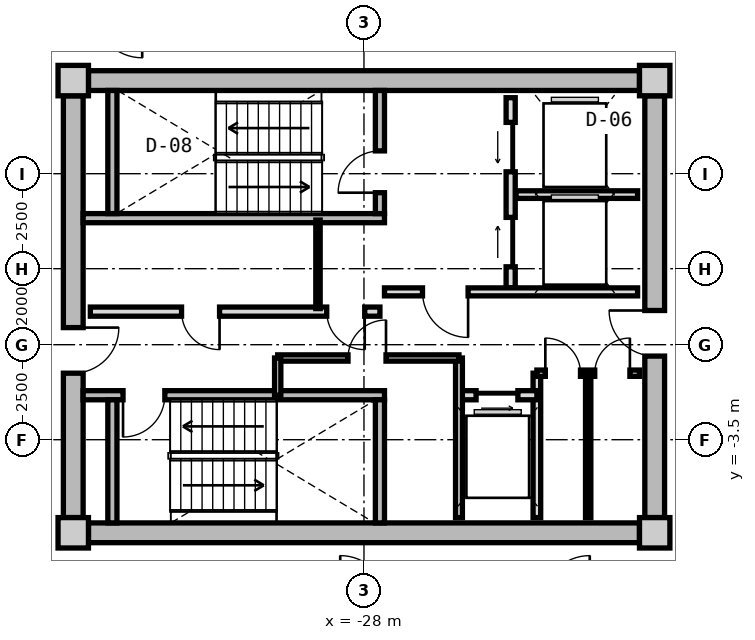
"""IFC4 building model, lengths in metres.
Left out: names, types, materials, properties, quantities, classifications, styles, units other than length and angle.
Written with IfcOpenShell. Run it as: python <this file> out.ifc"""

import sys

from ifc_helpers import new_model, si_unit, direction, frame, frame_2d, origin, origin_2d, place, context, subcontext, project, spatial, rectangle, extrude, source, transform, mapped, element, fill, save


model = new_model("IFC4")
c1 = context("Model", 3, precision=1e-05, world=origin(), true_north=direction((0.0, 1.0)))
c2 = subcontext(c1, "Body", "Model", "MODEL_VIEW")
j1 = project(units=[si_unit("LENGTHUNIT", "METRE"), si_unit("PLANEANGLEUNIT", "RADIAN")], contexts=[c1])
p1 = place(None, origin())
s1 = spatial("IfcSite", under=j1, at=p1, CompositionType="ELEMENT")
p2 = place(p1, origin())
s2 = spatial("IfcBuilding", under=s1, at=p2, CompositionType="ELEMENT")
p3 = place(p2, frame((0.0, 0.0, 203.8)))
s3 = spatial("IfcBuildingStorey", under=s2, at=p3, CompositionType="ELEMENT", Elevation=203.8)
m1 = source(origin(), c2, "Body", "SweptSolid", [
    extrude(rectangle(XDim=0.8, YDim=0.8, at=origin_2d()), origin(), (0.0, 0.0, 1.0), 4.0),
])
for number, where, z_axis, x_axis in (
    (1, (-35.65, -5.95, 0.0), (0.0, 0.0, 1.0), (1.0, 0.0, 0.0)),
    (2, (-20.35, -5.95, 0.0), (0.0, 0.0, 1.0), (1.0, 0.0, 0.0)),
    (3, (-20.35, 5.95, 0.0), (0.0, 0.0, 1.0), (1.0, 0.0, 0.0)),
    (4, (-35.65, 5.95, 0.0), (0.0, 0.0, 1.0), (1.0, 0.0, 0.0)),
):
    element("IfcColumn", number, at=place(p3, frame(where, z_axis=z_axis, x_axis=x_axis)), inside=s3, PredefinedType="COLUMN", context=c2, shape_type="MappedRepresentation", body=[
        mapped(m1, transform((0.0, 0.0, 0.0), x_axis=(1.0, 0.0, 0.0), y_axis=(0.0, 1.0, 0.0), z_axis=(0.0, 0.0, 1.0), scale=1.0)),
    ])
m2 = source(origin(), c2, "Body", "SweptSolid", [
    extrude(rectangle(XDim=14.5, YDim=0.52, at=frame_2d((7.25, 0.0))), origin(), (0.0, 0.0, 1.0), 3.71),
])
for number, where, z_axis, x_axis in (
    (5, (-35.25, 5.95, 0.0), (0.0, 0.0, 1.0), (1.0, 0.0, 0.0)),
    (6, (-20.75, -5.95, 0.0), (0.0, 0.0, 1.0), (-1.0, 0.0, 0.0)),
):
    element("IfcWall", number, at=place(p3, frame(where, z_axis=z_axis, x_axis=x_axis)), inside=s3, PredefinedType="SHEAR", context=c2, shape_type="MappedRepresentation", body=[
        mapped(m2, transform((0.0, 0.0, 0.0), x_axis=(1.0, 0.0, 0.0), y_axis=(0.0, 1.0, 0.0), z_axis=(0.0, 0.0, 1.0), scale=1.0)),
    ])
m3 = source(origin(), c2, "Body", "SweptSolid", [
    extrude(rectangle(XDim=11.1, YDim=0.52, at=frame_2d((5.55, 0.0))), origin(), (0.0, 0.0, 1.0), 3.71),
])
p4 = place(p3, frame((-35.65, -5.55, 0.0), z_axis=(0.0, 0.0, 1.0), x_axis=(0.0, 1.0, 0.0)))
e7 = element("IfcWall", 7, at=p4, inside=s3, PredefinedType="SHEAR", context=c2, shape_type="MappedRepresentation", body=[
    mapped(m3, transform((0.0, 0.0, 0.0), x_axis=(1.0, 0.0, 0.0), y_axis=(0.0, 1.0, 0.0), z_axis=(0.0, 0.0, 1.0), scale=1.0)),
])
p5 = place(p4, frame((3.8, 0.0, 0.0)))
e8 = element("IfcOpeningElement", 8, at=p5, cuts=e7, PredefinedType="OPENING", context=c2, shape_type="SweptSolid", body=[
    extrude(rectangle(XDim=1.2, YDim=2.15, at=frame_2d((0.6, 1.075))), frame((0.0, 0.27, 0.0), z_axis=(0.0, -1.0, 0.0), x_axis=(1.0, 0.0, 0.0)), (0.0, 0.0, 1.0), 0.54),
])
p6 = place(p3, frame((-20.35, 5.55, 0.0), z_axis=(0.0, 0.0, 1.0), x_axis=(0.0, -1.0, 0.0)))
e9 = element("IfcWall", 9, at=p6, inside=s3, PredefinedType="SHEAR", context=c2, shape_type="MappedRepresentation", body=[
    mapped(m3, transform((0.0, 0.0, 0.0), x_axis=(1.0, 0.0, 0.0), y_axis=(0.0, 1.0, 0.0), z_axis=(0.0, 0.0, 1.0), scale=1.0)),
])
p7 = place(p6, frame((5.65, 0.0, 0.0)))
e10 = element("IfcOpeningElement", 10, at=p7, cuts=e9, PredefinedType="OPENING", context=c2, shape_type="SweptSolid", body=[
    extrude(rectangle(XDim=1.2, YDim=2.15, at=frame_2d((0.6, 1.075))), frame((0.0, 0.27, 0.0), z_axis=(0.0, -1.0, 0.0), x_axis=(1.0, 0.0, 0.0)), (0.0, 0.0, 1.0), 0.54),
])
m4 = source(origin(), c2, "Body", "SweptSolid", [
    extrude(rectangle(XDim=7.93, YDim=0.24, at=frame_2d((3.965, 0.0))), origin(), (0.0, 0.0, 1.0), 3.71),
])
p8 = place(p3, frame((-35.39, 2.33, 0.0), z_axis=(0.0, 0.0, 1.0), x_axis=(1.0, 0.0, 0.0)))
e11 = element("IfcWall", 11, at=p8, inside=s3, PredefinedType="PARTITIONING", context=c2, shape_type="MappedRepresentation", body=[
    mapped(m4, transform((0.0, 0.0, 0.0), x_axis=(1.0, 0.0, 0.0), y_axis=(0.0, 1.0, 0.0), z_axis=(0.0, 0.0, 1.0), scale=1.0)),
])
m5 = source(origin(), c2, "Body", "SweptSolid", [
    extrude(rectangle(XDim=3.24, YDim=0.24, at=frame_2d((1.62, 0.0))), origin(), (0.0, 0.0, 1.0), 3.71),
])
p9 = place(p3, frame((-34.62, 2.45, 0.0), z_axis=(0.0, 0.0, 1.0), x_axis=(0.0, 1.0, 0.0)))
e12 = element("IfcWall", 12, at=p9, inside=s3, PredefinedType="PARTITIONING", context=c2, shape_type="MappedRepresentation", body=[
    mapped(m5, transform((0.0, 0.0, 0.0), x_axis=(1.0, 0.0, 0.0), y_axis=(0.0, 1.0, 0.0), z_axis=(0.0, 0.0, 1.0), scale=1.0)),
])
p10 = place(p3, frame((-27.58, 2.45, 0.0), z_axis=(0.0, 0.0, 1.0), x_axis=(0.0, 1.0, 0.0)))
e13 = element("IfcWall", 13, at=p10, inside=s3, PredefinedType="PARTITIONING", context=c2, shape_type="MappedRepresentation", body=[
    mapped(m5, transform((0.0, 0.0, 0.0), x_axis=(1.0, 0.0, 0.0), y_axis=(0.0, 1.0, 0.0), z_axis=(0.0, 0.0, 1.0), scale=1.0)),
])
p11 = place(p10, frame((0.55, 0.0, 0.0)))
e14 = element("IfcOpeningElement", 14, at=p11, cuts=e13, PredefinedType="OPENING", context=c2, shape_type="SweptSolid", body=[
    extrude(rectangle(XDim=1.1, YDim=2.15, at=frame_2d((0.55, 1.075))), frame((0.0, 0.13, 0.0), z_axis=(0.0, -1.0, 0.0), x_axis=(1.0, 0.0, 0.0)), (0.0, 0.0, 1.0), 0.26),
])
p12 = place(p3, frame((-35.39, -2.33, 0.0), z_axis=(0.0, 0.0, 1.0), x_axis=(1.0, 0.0, 0.0)))
e15 = element("IfcWall", 15, at=p12, inside=s3, PredefinedType="PARTITIONING", context=c2, shape_type="MappedRepresentation", body=[
    mapped(m4, transform((0.0, 0.0, 0.0), x_axis=(1.0, 0.0, 0.0), y_axis=(0.0, 1.0, 0.0), z_axis=(0.0, 0.0, 1.0), scale=1.0)),
])
p13 = place(p12, frame((1.05, 0.0, 0.0)))
e16 = element("IfcOpeningElement", 16, at=p13, cuts=e15, PredefinedType="OPENING", context=c2, shape_type="SweptSolid", body=[
    extrude(rectangle(XDim=1.1, YDim=2.15, at=frame_2d((0.55, 1.075))), frame((0.0, 0.13, 0.0), z_axis=(0.0, -1.0, 0.0), x_axis=(1.0, 0.0, 0.0)), (0.0, 0.0, 1.0), 0.26),
])
for number, where, z_axis, x_axis in (
    (17, (-34.62, -5.69, 0.0), (0.0, 0.0, 1.0), (0.0, 1.0, 0.0)),
    (18, (-27.58, -5.69, 0.0), (0.0, 0.0, 1.0), (0.0, 1.0, 0.0)),
):
    element("IfcWall", number, at=place(p3, frame(where, z_axis=z_axis, x_axis=x_axis)), inside=s3, PredefinedType="PARTITIONING", context=c2, shape_type="MappedRepresentation", body=[
        mapped(m5, transform((0.0, 0.0, 0.0), x_axis=(1.0, 0.0, 0.0), y_axis=(0.0, 1.0, 0.0), z_axis=(0.0, 0.0, 1.0), scale=1.0)),
    ])
m6 = source(origin(), c2, "Body", "SweptSolid", [
    extrude(rectangle(XDim=5.0, YDim=0.24, at=frame_2d((2.5, 0.0))), origin(), (0.0, 0.0, 1.0), 3.695),
])
p14 = place(p3, frame((-24.14, 0.5, 0.0), z_axis=(0.0, 0.0, 1.0), x_axis=(0.0, 1.0, 0.0)))
e19 = element("IfcWall", 19, at=p14, inside=s3, PredefinedType="PARTITIONING", context=c2, shape_type="MappedRepresentation", body=[
    mapped(m6, transform((0.0, 0.0, 0.0), x_axis=(1.0, 0.0, 0.0), y_axis=(0.0, 1.0, 0.0), z_axis=(0.0, 0.0, 1.0), scale=1.0)),
])
p15 = place(p14, frame((3.05, 0.0, 0.0)))
e20 = element("IfcOpeningElement", 20, at=p15, cuts=e19, PredefinedType="OPENING", context=c2, shape_type="SweptSolid", body=[
    extrude(rectangle(XDim=1.3, YDim=2.2, at=frame_2d((0.65, 1.1))), frame((0.0, 0.13, 0.0), z_axis=(0.0, -1.0, 0.0), x_axis=(1.0, 0.0, 0.0)), (0.0, 0.0, 1.0), 0.26),
])
p16 = place(p14, frame((0.55, 0.0, 0.0)))
e21 = element("IfcOpeningElement", 21, at=p16, cuts=e19, PredefinedType="OPENING", context=c2, shape_type="SweptSolid", body=[
    extrude(rectangle(XDim=1.3, YDim=2.2, at=frame_2d((0.65, 1.1))), frame((0.0, 0.13, 0.0), z_axis=(0.0, -1.0, 0.0), x_axis=(1.0, 0.0, 0.0)), (0.0, 0.0, 1.0), 0.26),
])
m7 = source(origin(), c2, "Body", "SweptSolid", [
    extrude(rectangle(XDim=3.2, YDim=0.2, at=frame_2d((1.6, 0.0))), origin(), (0.0, 0.0, 1.0), 3.695),
])
p17 = place(p3, frame((-24.0, 2.95, 0.0), z_axis=(0.0, 0.0, 1.0), x_axis=(1.0, 0.0, 0.0)))
e22 = element("IfcWall", 22, at=p17, inside=s3, PredefinedType="PARTITIONING", context=c2, shape_type="MappedRepresentation", body=[
    mapped(m7, transform((0.0, 0.0, 0.0), x_axis=(1.0, 0.0, 0.0), y_axis=(0.0, 1.0, 0.0), z_axis=(0.0, 0.0, 1.0), scale=1.0)),
])
m8 = source(origin(), c2, "Body", "SweptSolid", [
    extrude(rectangle(XDim=6.66, YDim=0.21, at=frame_2d((3.33, 0.0))), origin(), (0.0, 0.0, 1.0), 3.695),
])
p18 = place(p3, frame((-27.46, 0.39, 0.0), z_axis=(0.0, 0.0, 1.0), x_axis=(1.0, 0.0, 0.0)))
e23 = element("IfcWall", 23, at=p18, inside=s3, PredefinedType="PARTITIONING", context=c2, shape_type="MappedRepresentation", body=[
    mapped(m8, transform((0.0, 0.0, 0.0), x_axis=(1.0, 0.0, 0.0), y_axis=(0.0, 1.0, 0.0), z_axis=(0.0, 0.0, 1.0), scale=1.0)),
])
p19 = place(p18, frame((1.0, 0.0, 0.0)))
e24 = element("IfcOpeningElement", 24, at=p19, cuts=e23, PredefinedType="OPENING", context=c2, shape_type="SweptSolid", body=[
    extrude(rectangle(XDim=1.2, YDim=2.15, at=frame_2d((0.6, 1.075))), frame((0.0, 0.115, 0.0), z_axis=(0.0, -1.0, 0.0), x_axis=(1.0, 0.0, 0.0)), (0.0, 0.0, 1.0), 0.23),
])
m9 = source(origin(), c2, "Body", "SweptSolid", [
    extrude(rectangle(XDim=7.62, YDim=0.24, at=frame_2d((3.81, 0.0))), origin(), (0.0, 0.0, 1.0), 3.695),
])
p20 = place(p3, frame((-35.2, -0.13, 0.0), z_axis=(0.0, 0.0, 1.0), x_axis=(1.0, 0.0, 0.0)))
e25 = element("IfcWall", 25, at=p20, inside=s3, PredefinedType="PARTITIONING", context=c2, shape_type="MappedRepresentation", body=[
    mapped(m9, transform((0.0, 0.0, 0.0), x_axis=(1.0, 0.0, 0.0), y_axis=(0.0, 1.0, 0.0), z_axis=(0.0, 0.0, 1.0), scale=1.0)),
])
p21 = place(p20, frame((6.22, 0.0, 0.0)))
e26 = element("IfcOpeningElement", 26, at=p21, cuts=e25, PredefinedType="OPENING", context=c2, shape_type="SweptSolid", body=[
    extrude(rectangle(XDim=1.0, YDim=2.1, at=frame_2d((0.5, 1.05))), frame((0.0, 0.13, 0.0), z_axis=(0.0, -1.0, 0.0), x_axis=(1.0, 0.0, 0.0)), (0.0, 0.0, 1.0), 0.26),
])
p22 = place(p20, frame((2.4, 0.0, 0.0)))
e27 = element("IfcOpeningElement", 27, at=p22, cuts=e25, PredefinedType="OPENING", context=c2, shape_type="SweptSolid", body=[
    extrude(rectangle(XDim=1.0, YDim=2.1, at=frame_2d((0.5, 1.05))), frame((0.0, 0.13, 0.0), z_axis=(0.0, -1.0, 0.0), x_axis=(1.0, 0.0, 0.0)), (0.0, 0.0, 1.0), 0.26),
])
m10 = source(origin(), c2, "Body", "SweptSolid", [
    extrude(rectangle(XDim=2.33, YDim=0.115, at=frame_2d((1.165, 0.0))), origin(), (0.0, 0.0, 1.0), 3.695),
])
p23 = place(p3, frame((-29.21, -0.05, 0.0), z_axis=(0.0, 0.0, 1.0), x_axis=(0.0, 1.0, 0.0)))
e28 = element("IfcWall", 28, at=p23, inside=s3, PredefinedType="PARTITIONING", context=c2, shape_type="MappedRepresentation", body=[
    mapped(m10, transform((0.0, 0.0, 0.0), x_axis=(1.0, 0.0, 0.0), y_axis=(0.0, 1.0, 0.0), z_axis=(0.0, 0.0, 1.0), scale=1.0)),
])
m11 = source(origin(), c2, "Body", "SweptSolid", [
    extrude(rectangle(XDim=3.8, YDim=0.2, at=frame_2d((1.9, 0.0))), origin(), (0.0, 0.0, 1.0), 3.695),
])
p24 = place(p3, frame((-23.45, -5.55, 0.0), z_axis=(0.0, 0.0, 1.0), x_axis=(0.0, 1.0, 0.0)))
e29 = element("IfcWall", 29, at=p24, inside=s3, PredefinedType="PARTITIONING", context=c2, shape_type="MappedRepresentation", body=[
    mapped(m11, transform((0.0, 0.0, 0.0), x_axis=(1.0, 0.0, 0.0), y_axis=(0.0, 1.0, 0.0), z_axis=(0.0, 0.0, 1.0), scale=1.0)),
])
m12 = source(origin(), c2, "Body", "SweptSolid", [
    extrude(rectangle(XDim=2.05, YDim=0.24, at=frame_2d((1.025, 0.0))), origin(), (0.0, 0.0, 1.0), 3.695),
])
p25 = place(p3, frame((-25.5, -2.33, 0.0), z_axis=(0.0, 0.0, 1.0), x_axis=(1.0, 0.0, 0.0)))
e30 = element("IfcWall", 30, at=p25, inside=s3, PredefinedType="PARTITIONING", context=c2, shape_type="MappedRepresentation", body=[
    mapped(m12, transform((0.0, 0.0, 0.0), x_axis=(1.0, 0.0, 0.0), y_axis=(0.0, 1.0, 0.0), z_axis=(0.0, 0.0, 1.0), scale=1.0)),
])
p26 = place(p25, frame((0.45, 0.0, 0.0)))
e31 = element("IfcOpeningElement", 31, at=p26, cuts=e30, PredefinedType="OPENING", context=c2, shape_type="SweptSolid", body=[
    extrude(rectangle(XDim=1.1, YDim=2.2, at=frame_2d((0.55, 1.1))), frame((0.0, 0.13, 0.0), z_axis=(0.0, -1.0, 0.0), x_axis=(1.0, 0.0, 0.0)), (0.0, 0.0, 1.0), 0.26),
])
m13 = source(origin(), c2, "Body", "SweptSolid", [
    extrude(rectangle(XDim=4.2, YDim=0.18, at=frame_2d((2.1, 0.0))), origin(), (0.0, 0.0, 1.0), 3.695),
])
p27 = place(p3, frame((-25.5, -5.55, 0.0), z_axis=(0.0, 0.0, 1.0), x_axis=(0.0, 1.0, 0.0)))
e32 = element("IfcWall", 32, at=p27, inside=s3, PredefinedType="PARTITIONING", context=c2, shape_type="MappedRepresentation", body=[
    mapped(m13, transform((0.0, 0.0, 0.0), x_axis=(1.0, 0.0, 0.0), y_axis=(0.0, 1.0, 0.0), z_axis=(0.0, 0.0, 1.0), scale=1.0)),
])
m14 = source(origin(), c2, "Body", "SweptSolid", [
    extrude(rectangle(XDim=4.77, YDim=0.165, at=frame_2d((2.385, 0.0))), origin(), (0.0, 0.0, 1.0), 3.695),
])
p28 = place(p3, frame((-30.27, -1.35, 0.0), z_axis=(0.0, 0.0, 1.0), x_axis=(1.0, 0.0, 0.0)))
e33 = element("IfcWall", 33, at=p28, inside=s3, PredefinedType="PARTITIONING", context=c2, shape_type="MappedRepresentation", body=[
    mapped(m14, transform((0.0, 0.0, 0.0), x_axis=(1.0, 0.0, 0.0), y_axis=(0.0, 1.0, 0.0), z_axis=(0.0, 0.0, 1.0), scale=1.0)),
])
p29 = place(p28, frame((1.85, 0.0, 0.0)))
e34 = element("IfcOpeningElement", 34, at=p29, cuts=e33, PredefinedType="OPENING", context=c2, shape_type="SweptSolid", body=[
    extrude(rectangle(XDim=1.0, YDim=2.1, at=frame_2d((0.5, 1.05))), frame((0.0, 0.093, 0.0), z_axis=(0.0, -1.0, 0.0), x_axis=(1.0, 0.0, 0.0)), (0.0, 0.0, 1.0), 0.185),
])
m15 = source(origin(), c2, "Body", "SweptSolid", [
    extrude(rectangle(XDim=0.98, YDim=0.165, at=frame_2d((0.49, 0.0))), origin(), (0.0, 0.0, 1.0), 3.695),
])
p30 = place(p3, frame((-30.27, -2.33, 0.0), z_axis=(0.0, 0.0, 1.0), x_axis=(0.0, 1.0, 0.0)))
e35 = element("IfcWall", 35, at=p30, inside=s3, PredefinedType="PARTITIONING", context=c2, shape_type="MappedRepresentation", body=[
    mapped(m15, transform((0.0, 0.0, 0.0), x_axis=(1.0, 0.0, 0.0), y_axis=(0.0, 1.0, 0.0), z_axis=(0.0, 0.0, 1.0), scale=1.0)),
])
m16 = source(origin(), c2, "Body", "SweptSolid", [
    extrude(rectangle(XDim=2.7, YDim=0.165, at=frame_2d((1.35, 0.0))), origin(), (0.0, 0.0, 1.0), 3.695),
])
p31 = place(p3, frame((-23.45, -1.75, 0.0), z_axis=(0.0, 0.0, 1.0), x_axis=(1.0, 0.0, 0.0)))
e36 = element("IfcWall", 36, at=p31, inside=s3, PredefinedType="PARTITIONING", context=c2, shape_type="MappedRepresentation", body=[
    mapped(m16, transform((0.0, 0.0, 0.0), x_axis=(1.0, 0.0, 0.0), y_axis=(0.0, 1.0, 0.0), z_axis=(0.0, 0.0, 1.0), scale=1.0)),
])
p32 = place(p31, frame((0.222, 0.0, 0.0)))
e37 = element("IfcOpeningElement", 37, at=p32, cuts=e36, PredefinedType="OPENING", context=c2, shape_type="SweptSolid", body=[
    extrude(rectangle(XDim=0.925, YDim=2.1, at=frame_2d((0.462, 1.05))), frame((0.0, 0.093, 0.0), z_axis=(0.0, -1.0, 0.0), x_axis=(1.0, 0.0, 0.0)), (0.0, 0.0, 1.0), 0.185),
])
p33 = place(p31, frame((1.522, 0.0, 0.0)))
e38 = element("IfcOpeningElement", 38, at=p33, cuts=e36, PredefinedType="OPENING", context=c2, shape_type="SweptSolid", body=[
    extrude(rectangle(XDim=0.925, YDim=2.1, at=frame_2d((0.462, 1.05))), frame((0.0, 0.093, 0.0), z_axis=(0.0, -1.0, 0.0), x_axis=(1.0, 0.0, 0.0)), (0.0, 0.0, 1.0), 0.185),
])
m17 = source(origin(), c2, "Body", "SweptSolid", [
    extrude(rectangle(XDim=3.8, YDim=0.14, at=frame_2d((1.9, 0.0))), origin(), (0.0, 0.0, 1.0), 3.695),
])
p34 = place(p3, frame((-22.1, -5.55, 0.0), z_axis=(0.0, 0.0, 1.0), x_axis=(0.0, 1.0, 0.0)))
e39 = element("IfcWall", 39, at=p34, inside=s3, PredefinedType="PARTITIONING", context=c2, shape_type="MappedRepresentation", body=[
    mapped(m17, transform((0.0, 0.0, 0.0), x_axis=(1.0, 0.0, 0.0), y_axis=(0.0, 1.0, 0.0), z_axis=(0.0, 0.0, 1.0), scale=1.0)),
])
m18 = source(origin(), c2, "Body", "SweptSolid", [
    extrude(rectangle(XDim=1.1, YDim=2.15, at=frame_2d((0.55, 1.075))), frame((0.0, 0.025, 0.0), z_axis=(0.0, -1.0, 0.0), x_axis=(1.0, 0.0, 0.0)), (0.0, 0.0, 1.0), 0.05),
])
p35 = place(p11, origin())
e40 = element("IfcDoor", 40, at=p35, inside=s3, OperationType="SINGLE_SWING_LEFT", PredefinedType="DOOR", context=c2, shape_type="MappedRepresentation", body=[
    mapped(m18, transform((0.0, 0.0, 0.0), x_axis=(1.0, 0.0, 0.0), y_axis=(0.0, 1.0, 0.0), z_axis=(0.0, 0.0, 1.0), scale=1.0)),
])
fill(e14, e40)
p36 = place(p13, frame((1.1, 0.0, 0.0), z_axis=(0.0, 0.0, 1.0), x_axis=(-1.0, 0.0, 0.0)))
e41 = element("IfcDoor", 41, at=p36, inside=s3, OperationType="SINGLE_SWING_RIGHT", PredefinedType="DOOR", context=c2, shape_type="MappedRepresentation", body=[
    mapped(m18, transform((0.0, 0.0, 0.0), x_axis=(1.0, 0.0, 0.0), y_axis=(0.0, 1.0, 0.0), z_axis=(0.0, 0.0, 1.0), scale=1.0)),
])
fill(e16, e41)
m19 = source(origin(), c2, "Body", "SweptSolid", [
    extrude(rectangle(XDim=1.3, YDim=2.2, at=frame_2d((0.65, 1.1))), frame((0.0, 0.025, 0.0), z_axis=(0.0, -1.0, 0.0), x_axis=(1.0, 0.0, 0.0)), (0.0, 0.0, 1.0), 0.05),
])
p37 = place(p15, origin())
e42 = element("IfcDoor", 42, at=p37, inside=s3, OperationType="SLIDING_TO_LEFT", PredefinedType="DOOR", context=c2, shape_type="MappedRepresentation", body=[
    mapped(m19, transform((0.0, 0.0, 0.0), x_axis=(1.0, 0.0, 0.0), y_axis=(0.0, 1.0, 0.0), z_axis=(0.0, 0.0, 1.0), scale=1.0)),
])
fill(e20, e42)
p38 = place(p16, origin())
e43 = element("IfcDoor", 43, at=p38, inside=s3, OperationType="SLIDING_TO_RIGHT", PredefinedType="DOOR", context=c2, shape_type="MappedRepresentation", body=[
    mapped(m19, transform((0.0, 0.0, 0.0), x_axis=(1.0, 0.0, 0.0), y_axis=(0.0, 1.0, 0.0), z_axis=(0.0, 0.0, 1.0), scale=1.0)),
])
fill(e21, e43)
m20 = source(origin(), c2, "Body", "SweptSolid", [
    extrude(rectangle(XDim=1.2, YDim=2.15, at=frame_2d((0.6, 1.075))), frame((0.0, 0.025, 0.0), z_axis=(0.0, -1.0, 0.0), x_axis=(1.0, 0.0, 0.0)), (0.0, 0.0, 1.0), 0.05),
])
p39 = place(p19, frame((1.2, 0.0, 0.0), z_axis=(0.0, 0.0, 1.0), x_axis=(-1.0, 0.0, 0.0)))
e44 = element("IfcDoor", 44, at=p39, inside=s3, OperationType="SINGLE_SWING_LEFT", PredefinedType="DOOR", context=c2, shape_type="MappedRepresentation", body=[
    mapped(m20, transform((0.0, 0.0, 0.0), x_axis=(1.0, 0.0, 0.0), y_axis=(0.0, 1.0, 0.0), z_axis=(0.0, 0.0, 1.0), scale=1.0)),
])
fill(e24, e44)
p40 = place(p5, frame((1.2, 0.0, 0.0), z_axis=(0.0, 0.0, 1.0), x_axis=(-1.0, 0.0, 0.0)))
e45 = element("IfcDoor", 45, at=p40, inside=s3, OperationType="SINGLE_SWING_LEFT", PredefinedType="DOOR", context=c2, shape_type="MappedRepresentation", body=[
    mapped(m20, transform((0.0, 0.0, 0.0), x_axis=(1.0, 0.0, 0.0), y_axis=(0.0, 1.0, 0.0), z_axis=(0.0, 0.0, 1.0), scale=1.0)),
])
fill(e8, e45)
p41 = place(p7, frame((1.2, 0.0, 0.0), z_axis=(0.0, 0.0, 1.0), x_axis=(-1.0, 0.0, 0.0)))
e46 = element("IfcDoor", 46, at=p41, inside=s3, OperationType="SINGLE_SWING_RIGHT", PredefinedType="DOOR", context=c2, shape_type="MappedRepresentation", body=[
    mapped(m20, transform((0.0, 0.0, 0.0), x_axis=(1.0, 0.0, 0.0), y_axis=(0.0, 1.0, 0.0), z_axis=(0.0, 0.0, 1.0), scale=1.0)),
])
fill(e10, e46)
m21 = source(origin(), c2, "Body", "SweptSolid", [
    extrude(rectangle(XDim=1.0, YDim=2.1, at=frame_2d((0.5, 1.05))), frame((0.0, 0.025, 0.0), z_axis=(0.0, -1.0, 0.0), x_axis=(1.0, 0.0, 0.0)), (0.0, 0.0, 1.0), 0.05),
])
p42 = place(p21, frame((1.0, 0.0, 0.0), z_axis=(0.0, 0.0, 1.0), x_axis=(-1.0, 0.0, 0.0)))
e47 = element("IfcDoor", 47, at=p42, inside=s3, OperationType="SINGLE_SWING_LEFT", PredefinedType="DOOR", context=c2, shape_type="MappedRepresentation", body=[
    mapped(m21, transform((0.0, 0.0, 0.0), x_axis=(1.0, 0.0, 0.0), y_axis=(0.0, 1.0, 0.0), z_axis=(0.0, 0.0, 1.0), scale=1.0)),
])
fill(e26, e47)
p43 = place(p22, frame((1.0, 0.0, 0.0), z_axis=(0.0, 0.0, 1.0), x_axis=(-1.0, 0.0, 0.0)))
e48 = element("IfcDoor", 48, at=p43, inside=s3, OperationType="SINGLE_SWING_LEFT", PredefinedType="DOOR", context=c2, shape_type="MappedRepresentation", body=[
    mapped(m21, transform((0.0, 0.0, 0.0), x_axis=(1.0, 0.0, 0.0), y_axis=(0.0, 1.0, 0.0), z_axis=(0.0, 0.0, 1.0), scale=1.0)),
])
fill(e27, e48)
m22 = source(origin(), c2, "Body", "SweptSolid", [
    extrude(rectangle(XDim=1.1, YDim=2.2, at=frame_2d((0.55, 1.1))), frame((0.0, 0.025, 0.0), z_axis=(0.0, -1.0, 0.0), x_axis=(1.0, 0.0, 0.0)), (0.0, 0.0, 1.0), 0.05),
])
p44 = place(p26, frame((1.1, 0.0, 0.0), z_axis=(0.0, 0.0, 1.0), x_axis=(-1.0, 0.0, 0.0)))
e49 = element("IfcDoor", 49, at=p44, inside=s3, OperationType="SLIDING_TO_RIGHT", PredefinedType="DOOR", context=c2, shape_type="MappedRepresentation", body=[
    mapped(m22, transform((0.0, 0.0, 0.0), x_axis=(1.0, 0.0, 0.0), y_axis=(0.0, 1.0, 0.0), z_axis=(0.0, 0.0, 1.0), scale=1.0)),
])
fill(e31, e49)
p45 = place(p29, origin())
e50 = element("IfcDoor", 50, at=p45, inside=s3, OperationType="SINGLE_SWING_RIGHT", PredefinedType="DOOR", context=c2, shape_type="MappedRepresentation", body=[
    mapped(m21, transform((0.0, 0.0, 0.0), x_axis=(1.0, 0.0, 0.0), y_axis=(0.0, 1.0, 0.0), z_axis=(0.0, 0.0, 1.0), scale=1.0)),
])
fill(e34, e50)
m23 = source(origin(), c2, "Body", "SweptSolid", [
    extrude(rectangle(XDim=0.925, YDim=2.1, at=frame_2d((0.462, 1.05))), frame((0.0, 0.025, 0.0), z_axis=(0.0, -1.0, 0.0), x_axis=(1.0, 0.0, 0.0)), (0.0, 0.0, 1.0), 0.05),
])
p46 = place(p32, origin())
e51 = element("IfcDoor", 51, at=p46, inside=s3, OperationType="SINGLE_SWING_LEFT", PredefinedType="DOOR", context=c2, shape_type="MappedRepresentation", body=[
    mapped(m23, transform((0.0, 0.0, 0.0), x_axis=(1.0, 0.0, 0.0), y_axis=(0.0, 1.0, 0.0), z_axis=(0.0, 0.0, 1.0), scale=1.0)),
])
fill(e37, e51)
p47 = place(p33, origin())
e52 = element("IfcDoor", 52, at=p47, inside=s3, OperationType="SINGLE_SWING_RIGHT", PredefinedType="DOOR", context=c2, shape_type="MappedRepresentation", body=[
    mapped(m23, transform((0.0, 0.0, 0.0), x_axis=(1.0, 0.0, 0.0), y_axis=(0.0, 1.0, 0.0), z_axis=(0.0, 0.0, 1.0), scale=1.0)),
])
fill(e38, e52)
save(model, sys.argv[1])
